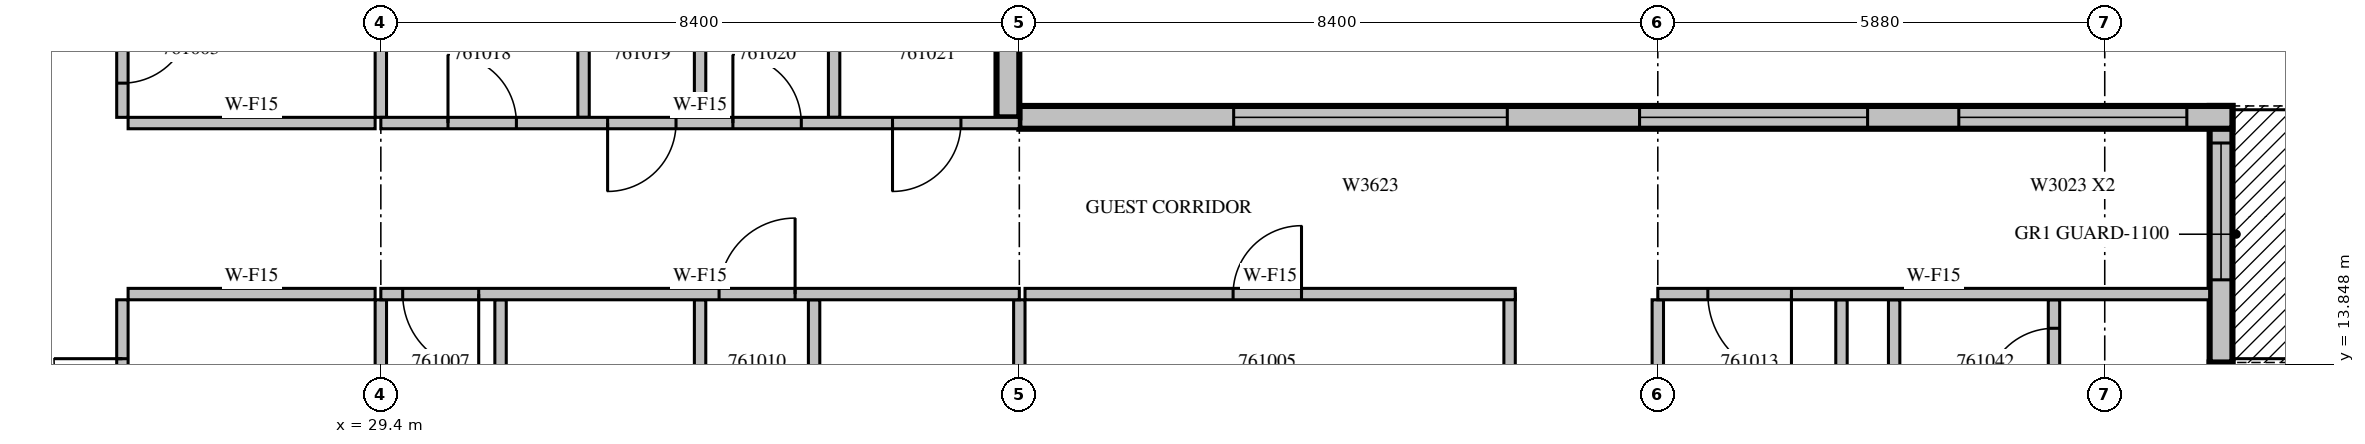
"""IFC4 building model, lengths in metres.
Left out: names, types, materials, properties, quantities, classifications, styles, units other than length and angle.
Written with IfcOpenShell. Run it as: python <this file> out.ifc"""

import sys

from ifc_helpers import new_model, si_unit, direction, frame, frame_2d, origin, place, context, subcontext, project, spatial, rectangle, extrude, source, transform, mapped, element, fill, save


model = new_model("IFC4")
c1 = context("Model", 3, precision=1e-05, world=origin(), true_north=direction((0.0, 1.0)))
c2 = subcontext(c1, "Body", "Model", "MODEL_VIEW")
j1 = project(units=[si_unit("LENGTHUNIT", "METRE"), si_unit("PLANEANGLEUNIT", "RADIAN")], contexts=[c1])
p1 = place(None, origin())
s1 = spatial("IfcSite", under=j1, at=p1, CompositionType="ELEMENT")
p2 = place(p1, origin())
s2 = spatial("IfcBuilding", under=s1, at=p2, CompositionType="ELEMENT")
p3 = place(p2, frame((0.0, 0.0, 265.2)))
s3 = spatial("IfcBuildingStorey", under=s2, at=p3, CompositionType="ELEMENT", Elevation=265.2)
m1 = source(origin(), c2, "Body", "SweptSolid", [
    extrude(rectangle(XDim=3.375, YDim=0.3, at=frame_2d((1.688, 0.0))), origin(), (0.0, 0.0, 1.0), 3.4),
])
p4 = place(p3, frame((53.61, 10.5, 0.0), z_axis=(0.0, 0.0, 1.0), x_axis=(0.0, 1.0, 0.0)))
e1 = element("IfcWall", 1, at=p4, inside=s3, PredefinedType="STANDARD", context=c2, shape_type="MappedRepresentation", body=[
    mapped(m1, transform((0.0, 0.0, 0.0), scale=1.0)),
])
m2 = source(origin(), c2, "Body", "SweptSolid", [
    extrude(rectangle(XDim=1.8, YDim=2.3, at=frame_2d((0.9, 1.15))), frame((0.0, 0.16, 0.0), z_axis=(0.0, -1.0, 0.0), x_axis=(1.0, 0.0, 0.0)), (0.0, 0.0, 1.0), 0.32),
])
p5 = place(p4, frame((0.787, 0.0, 0.6)))
e2 = element("IfcOpeningElement", 2, at=p5, cuts=e1, PredefinedType="OPENING", context=c2, shape_type="MappedRepresentation", body=[
    mapped(m2, transform((0.0, 0.0, 0.0), scale=1.0)),
])
p6 = place(p3, frame((53.61, 13.875, 0.0), z_axis=(0.0, 0.0, 1.0), x_axis=(0.0, 1.0, 0.0)))
e3 = element("IfcWall", 3, at=p6, inside=s3, PredefinedType="STANDARD", context=c2, shape_type="MappedRepresentation", body=[
    mapped(m1, transform((0.0, 0.0, 0.0), scale=1.0)),
])
m3 = source(origin(), c2, "Body", "SweptSolid", [
    extrude(rectangle(XDim=1.8, YDim=2.4, at=frame_2d((0.9, 1.2))), frame((0.0, 0.16, 0.0), z_axis=(0.0, -1.0, 0.0), x_axis=(1.0, 0.0, 0.0)), (0.0, 0.0, 1.0), 0.32),
])
p7 = place(p6, frame((1.087, 0.0, 0.0)))
e4 = element("IfcOpeningElement", 4, at=p7, cuts=e3, PredefinedType="OPENING", context=c2, shape_type="MappedRepresentation", body=[
    mapped(m3, transform((0.0, 0.0, 0.0), scale=1.0)),
])
m4 = source(origin(), c2, "Body", "SweptSolid", [
    extrude(rectangle(XDim=15.96, YDim=0.3, at=frame_2d((7.98, 0.0))), origin(), (0.0, 0.0, 1.0), 3.4),
])
p8 = place(p3, frame((53.76, 17.1, 0.0), z_axis=(0.0, 0.0, 1.0), x_axis=(-1.0, 0.0, 0.0)))
e5 = element("IfcWall", 5, at=p8, inside=s3, PredefinedType="STANDARD", context=c2, shape_type="MappedRepresentation", body=[
    mapped(m4, transform((0.0, 0.0, 0.0), scale=1.0)),
])
m5 = source(origin(), c2, "Body", "SweptSolid", [
    extrude(rectangle(XDim=3.0, YDim=2.3, at=frame_2d((1.5, 1.15))), frame((0.0, 0.16, 0.0), z_axis=(0.0, -1.0, 0.0), x_axis=(1.0, 0.0, 0.0)), (0.0, 0.0, 1.0), 0.32),
])
p9 = place(p8, frame((0.6, 0.0, 0.6)))
e6 = element("IfcOpeningElement", 6, at=p9, cuts=e5, PredefinedType="OPENING", context=c2, shape_type="MappedRepresentation", body=[
    mapped(m5, transform((0.0, 0.0, 0.0), scale=1.0)),
])
p10 = place(p8, frame((4.8, 0.0, 0.6)))
e7 = element("IfcOpeningElement", 7, at=p10, cuts=e5, PredefinedType="OPENING", context=c2, shape_type="MappedRepresentation", body=[
    mapped(m5, transform((0.0, 0.0, 0.0), scale=1.0)),
])
m6 = source(origin(), c2, "Body", "SweptSolid", [
    extrude(rectangle(XDim=3.6, YDim=2.3, at=frame_2d((1.8, 1.15))), frame((0.0, 0.16, 0.0), z_axis=(0.0, -1.0, 0.0), x_axis=(1.0, 0.0, 0.0)), (0.0, 0.0, 1.0), 0.32),
])
p11 = place(p8, frame((9.54, 0.0, 0.6)))
e8 = element("IfcOpeningElement", 8, at=p11, cuts=e5, PredefinedType="OPENING", context=c2, shape_type="MappedRepresentation", body=[
    mapped(m6, transform((0.0, 0.0, 0.0), scale=1.0)),
])
m7 = source(origin(), c2, "Body", "SweptSolid", [
    extrude(rectangle(XDim=3.1, YDim=0.3, at=frame_2d((1.55, 0.0))), origin(), (0.0, 0.0, 1.0), 3.4),
])
p12 = place(p3, frame((37.65, 17.1, 0.0), z_axis=(0.0, 0.0, 1.0), x_axis=(0.0, 1.0, 0.0)))
e9 = element("IfcWall", 9, at=p12, inside=s3, PredefinedType="STANDARD", context=c2, shape_type="MappedRepresentation", body=[
    mapped(m7, transform((0.0, 0.0, 0.0), scale=1.0)),
])
p13 = place(p12, frame((1.125, 0.0, 0.6)))
e10 = element("IfcOpeningElement", 10, at=p13, cuts=e9, PredefinedType="OPENING", context=c2, shape_type="MappedRepresentation", body=[
    mapped(m2, transform((0.0, 0.0, 0.0), scale=1.0)),
])
m8 = source(origin(), c2, "Body", "SweptSolid", [
    extrude(rectangle(XDim=11.225, YDim=0.15, at=frame_2d((5.612, 0.0))), origin(), (0.0, 0.0, 1.0), 3.4),
])
p14 = place(p3, frame((26.0, 14.7, 0.0), z_axis=(0.0, 0.0, 1.0), x_axis=(0.0, -1.0, 0.0)))
e11 = element("IfcWall", 11, at=p14, inside=s3, PredefinedType="PARTITIONING", context=c2, shape_type="MappedRepresentation", body=[
    mapped(m8, transform((0.0, 0.0, 0.0), scale=1.0)),
])
m9 = source(origin(), c2, "Body", "SweptSolid", [
    extrude(rectangle(XDim=0.9, YDim=2.1, at=frame_2d((0.45, 1.05))), frame((0.0, 0.085, 0.0), z_axis=(0.0, -1.0, 0.0), x_axis=(1.0, 0.0, 0.0)), (0.0, 0.0, 1.0), 0.17),
])
p15 = place(p14, frame((7.263, 0.0, 0.0)))
e12 = element("IfcOpeningElement", 12, at=p15, cuts=e11, PredefinedType="OPENING", context=c2, shape_type="MappedRepresentation", body=[
    mapped(m9, transform((0.0, 0.0, 0.0), scale=1.0)),
])
p16 = place(p14, frame((0.775, 0.0, 0.0)))
e13 = element("IfcOpeningElement", 13, at=p16, cuts=e11, PredefinedType="OPENING", context=c2, shape_type="MappedRepresentation", body=[
    mapped(m9, transform((0.0, 0.0, 0.0), scale=1.0)),
])
m10 = source(origin(), c2, "Body", "SweptSolid", [
    extrude(rectangle(XDim=3.6, YDim=0.15, at=frame_2d((1.8, 0.0))), origin(), (0.0, 0.0, 1.0), 3.4),
])
p17 = place(p3, frame((26.0, 20.7, 0.0), z_axis=(0.0, 0.0, 1.0), x_axis=(0.0, -1.0, 0.0)))
e14 = element("IfcWall", 14, at=p17, inside=s3, PredefinedType="PARTITIONING", context=c2, shape_type="MappedRepresentation", body=[
    mapped(m10, transform((0.0, 0.0, 0.0), scale=1.0)),
])
p18 = place(p17, frame((2.25, 0.0, 0.0)))
e15 = element("IfcOpeningElement", 15, at=p18, cuts=e14, PredefinedType="OPENING", context=c2, shape_type="MappedRepresentation", body=[
    mapped(m9, transform((0.0, 0.0, 0.0), scale=1.0)),
])
m11 = source(origin(), c2, "Body", "SweptSolid", [
    extrude(rectangle(XDim=3.25, YDim=0.15, at=frame_2d((1.625, 0.0))), origin(), (0.0, 0.0, 1.0), 3.4),
])
for number, where, z_axis, x_axis in (
    (16, (29.325, 14.775, 0.0), (0.0, 0.0, 1.0), (-1.0, 0.0, 0.0)),
    (17, (26.075, 17.025, 0.0), (0.0, 0.0, 1.0), (1.0, 0.0, 0.0)),
):
    element("IfcWall", number, at=place(p3, frame(where, z_axis=z_axis, x_axis=x_axis)), inside=s3, PredefinedType="PARTITIONING", context=c2, shape_type="MappedRepresentation", body=[
        mapped(m11, transform((0.0, 0.0, 0.0), scale=1.0)),
    ])
m12 = source(origin(), c2, "Body", "SweptSolid", [
    extrude(rectangle(XDim=3.801, YDim=0.15, at=frame_2d((1.901, 0.0))), origin(), (0.0, 0.0, 1.0), 3.4),
])
p19 = place(p3, frame((29.4, 10.899, 0.0), z_axis=(0.0, 0.0, 1.0), x_axis=(0.0, 1.0, 0.0)))
e18 = element("IfcWall", 18, at=p19, inside=s3, PredefinedType="PARTITIONING", context=c2, shape_type="MappedRepresentation", body=[
    mapped(m12, transform((0.0, 0.0, 0.0), scale=1.0)),
])
m13 = source(origin(), c2, "Body", "SweptSolid", [
    extrude(rectangle(XDim=3.101, YDim=0.15, at=frame_2d((1.55, 0.0))), origin(), (0.0, 0.0, 1.0), 3.4),
])
p20 = place(p3, frame((29.4, 17.1, 0.0), z_axis=(0.0, 0.0, 1.0), x_axis=(0.0, 1.0, 0.0)))
e19 = element("IfcWall", 19, at=p20, inside=s3, PredefinedType="PARTITIONING", context=c2, shape_type="MappedRepresentation", body=[
    mapped(m13, transform((0.0, 0.0, 0.0), scale=1.0)),
])
m14 = source(origin(), c2, "Body", "SweptSolid", [
    extrude(rectangle(XDim=2.475, YDim=0.15, at=frame_2d((1.238, 0.0))), origin(), (0.0, 0.0, 1.0), 3.4),
])
p21 = place(p3, frame((44.25, 12.3, 0.0), z_axis=(0.0, 0.0, 1.0), x_axis=(0.0, 1.0, 0.0)))
e20 = element("IfcWall", 20, at=p21, inside=s3, PredefinedType="PARTITIONING", context=c2, shape_type="MappedRepresentation", body=[
    mapped(m14, transform((0.0, 0.0, 0.0), scale=1.0)),
])
m15 = source(origin(), c2, "Body", "SweptSolid", [
    extrude(rectangle(XDim=6.45, YDim=0.15, at=frame_2d((3.225, 0.0))), origin(), (0.0, 0.0, 1.0), 3.4),
])
p22 = place(p3, frame((44.325, 14.775, 0.0), z_axis=(0.0, 0.0, 1.0), x_axis=(-1.0, 0.0, 0.0)))
e21 = element("IfcWall", 21, at=p22, inside=s3, PredefinedType="PARTITIONING", context=c2, shape_type="MappedRepresentation", body=[
    mapped(m15, transform((0.0, 0.0, 0.0), scale=1.0)),
])
p23 = place(p22, frame((2.812, 0.0, 0.0)))
e22 = element("IfcOpeningElement", 22, at=p23, cuts=e21, PredefinedType="OPENING", context=c2, shape_type="MappedRepresentation", body=[
    mapped(m9, transform((0.0, 0.0, 0.0), scale=1.0)),
])
m16 = source(origin(), c2, "Body", "SweptSolid", [
    extrude(rectangle(XDim=3.65, YDim=0.15, at=frame_2d((1.825, 0.0))), origin(), (0.0, 0.0, 1.0), 3.4),
])
for number, where, z_axis, x_axis in (
    (23, (30.975, 11.05, 0.0), (0.0, 0.0, 1.0), (0.0, 1.0, 0.0)),
    (24, (33.6, 11.05, 0.0), (0.0, 0.0, 1.0), (0.0, 1.0, 0.0)),
    (25, (35.1, 11.05, 0.0), (0.0, 0.0, 1.0), (0.0, 1.0, 0.0)),
    (26, (37.8, 11.05, 0.0), (0.0, 0.0, 1.0), (0.0, 1.0, 0.0)),
    (27, (48.617, 11.05, 0.0), (0.0, 0.0, 1.0), (0.0, 1.0, 0.0)),
    (28, (49.309, 11.05, 0.0), (0.0, 0.0, 1.0), (0.0, 1.0, 0.0)),
):
    element("IfcWall", number, at=place(p3, frame(where, z_axis=z_axis, x_axis=x_axis)), inside=s3, PredefinedType="PARTITIONING", context=c2, shape_type="MappedRepresentation", body=[
        mapped(m16, transform((0.0, 0.0, 0.0), scale=1.0)),
    ])
p24 = place(p3, frame((51.412, 11.05, 0.0), z_axis=(0.0, 0.0, 1.0), x_axis=(0.0, 1.0, 0.0)))
e29 = element("IfcWall", 29, at=p24, inside=s3, PredefinedType="PARTITIONING", context=c2, shape_type="MappedRepresentation", body=[
    mapped(m16, transform((0.0, 0.0, 0.0), scale=1.0)),
])
p25 = place(p24, frame((1.375, 0.0, 0.0)))
e30 = element("IfcOpeningElement", 30, at=p25, cuts=e29, PredefinedType="OPENING", context=c2, shape_type="MappedRepresentation", body=[
    mapped(m9, transform((0.0, 0.0, 0.0), scale=1.0)),
])
p26 = place(p24, frame((2.375, 0.0, 0.0)))
e31 = element("IfcOpeningElement", 31, at=p26, cuts=e29, PredefinedType="OPENING", context=c2, shape_type="MappedRepresentation", body=[
    mapped(m9, transform((0.0, 0.0, 0.0), scale=1.0)),
])
p27 = place(p24, frame((0.375, 0.0, 0.0)))
e32 = element("IfcOpeningElement", 32, at=p27, cuts=e29, PredefinedType="OPENING", context=c2, shape_type="MappedRepresentation", body=[
    mapped(m9, transform((0.0, 0.0, 0.0), scale=1.0)),
])
p28 = place(p3, frame((46.2, 11.05, 0.0), z_axis=(0.0, 0.0, 1.0), x_axis=(0.0, 1.0, 0.0)))
e33 = element("IfcWall", 33, at=p28, inside=s3, PredefinedType="PARTITIONING", context=c2, shape_type="MappedRepresentation", body=[
    mapped(m16, transform((0.0, 0.0, 0.0), scale=1.0)),
])
for number, where, z_axis, x_axis in (
    (34, (32.067, 20.7, 0.0), (0.0, 0.0, 1.0), (0.0, -1.0, 0.0)),
    (35, (35.363, 20.7, 0.0), (0.0, 0.0, 1.0), (0.0, -1.0, 0.0)),
    (36, (33.6, 17.1, 0.0), (0.0, 0.0, 1.0), (0.0, 1.0, 0.0)),
):
    element("IfcWall", number, at=place(p3, frame(where, z_axis=z_axis, x_axis=x_axis)), inside=s3, PredefinedType="PARTITIONING", context=c2, shape_type="MappedRepresentation", body=[
        mapped(m10, transform((0.0, 0.0, 0.0), scale=1.0)),
    ])
m17 = source(origin(), c2, "Body", "SweptSolid", [
    extrude(rectangle(XDim=8.4, YDim=0.15, at=frame_2d((4.2, 0.0))), origin(), (0.0, 0.0, 1.0), 3.4),
])
p29 = place(p3, frame((37.8, 14.775, 0.0), z_axis=(0.0, 0.0, 1.0), x_axis=(-1.0, 0.0, 0.0)))
e37 = element("IfcWall", 37, at=p29, inside=s3, PredefinedType="PARTITIONING", context=c2, shape_type="MappedRepresentation", body=[
    mapped(m17, transform((0.0, 0.0, 0.0), scale=1.0)),
])
m18 = source(origin(), c2, "Body", "SweptSolid", [
    extrude(rectangle(XDim=1.0, YDim=2.1, at=frame_2d((0.5, 1.05))), frame((0.0, 0.085, 0.0), z_axis=(0.0, -1.0, 0.0), x_axis=(1.0, 0.0, 0.0)), (0.0, 0.0, 1.0), 0.17),
])
p30 = place(p29, frame((7.112, 0.0, 0.0)))
e38 = element("IfcOpeningElement", 38, at=p30, cuts=e37, PredefinedType="OPENING", context=c2, shape_type="MappedRepresentation", body=[
    mapped(m18, transform((0.0, 0.0, 0.0), scale=1.0)),
])
p31 = place(p29, frame((2.95, 0.0, 0.0)))
e39 = element("IfcOpeningElement", 39, at=p31, cuts=e37, PredefinedType="OPENING", context=c2, shape_type="MappedRepresentation", body=[
    mapped(m18, transform((0.0, 0.0, 0.0), scale=1.0)),
])
m19 = source(origin(), c2, "Body", "SweptSolid", [
    extrude(rectangle(XDim=7.26, YDim=0.15, at=frame_2d((3.63, 0.0))), origin(), (0.0, 0.0, 1.0), 3.4),
])
p32 = place(p3, frame((53.46, 14.775, 0.0), z_axis=(0.0, 0.0, 1.0), x_axis=(-1.0, 0.0, 0.0)))
e40 = element("IfcWall", 40, at=p32, inside=s3, PredefinedType="PARTITIONING", context=c2, shape_type="MappedRepresentation", body=[
    mapped(m19, transform((0.0, 0.0, 0.0), scale=1.0)),
])
m20 = source(origin(), c2, "Body", "SweptSolid", [
    extrude(rectangle(XDim=1.1, YDim=2.1, at=frame_2d((0.55, 1.05))), frame((0.0, 0.085, 0.0), z_axis=(0.0, -1.0, 0.0), x_axis=(1.0, 0.0, 0.0)), (0.0, 0.0, 1.0), 0.17),
])
p33 = place(p32, frame((5.502, 0.0, 0.0)))
e41 = element("IfcOpeningElement", 41, at=p33, cuts=e40, PredefinedType="OPENING", context=c2, shape_type="MappedRepresentation", body=[
    mapped(m20, transform((0.0, 0.0, 0.0), scale=1.0)),
])
p34 = place(p3, frame((29.4, 17.025, 0.0), z_axis=(0.0, 0.0, 1.0), x_axis=(1.0, 0.0, 0.0)))
e42 = element("IfcWall", 42, at=p34, inside=s3, PredefinedType="PARTITIONING", context=c2, shape_type="MappedRepresentation", body=[
    mapped(m17, transform((0.0, 0.0, 0.0), scale=1.0)),
])
p35 = place(p34, frame((0.883, 0.0, 0.0)))
e43 = element("IfcOpeningElement", 43, at=p35, cuts=e42, PredefinedType="OPENING", context=c2, shape_type="MappedRepresentation", body=[
    mapped(m9, transform((0.0, 0.0, 0.0), scale=1.0)),
])
p36 = place(p34, frame((2.983, 0.0, 0.0)))
e44 = element("IfcOpeningElement", 44, at=p36, cuts=e42, PredefinedType="OPENING", context=c2, shape_type="MappedRepresentation", body=[
    mapped(m9, transform((0.0, 0.0, 0.0), scale=1.0)),
])
p37 = place(p34, frame((4.632, 0.0, 0.0)))
e45 = element("IfcOpeningElement", 45, at=p37, cuts=e42, PredefinedType="OPENING", context=c2, shape_type="MappedRepresentation", body=[
    mapped(m9, transform((0.0, 0.0, 0.0), scale=1.0)),
])
p38 = place(p34, frame((6.732, 0.0, 0.0)))
e46 = element("IfcOpeningElement", 46, at=p38, cuts=e42, PredefinedType="OPENING", context=c2, shape_type="MappedRepresentation", body=[
    mapped(m9, transform((0.0, 0.0, 0.0), scale=1.0)),
])
m21 = source(origin(), c2, "Body", "SweptSolid", [
    extrude(rectangle(XDim=1.8, YDim=2.4, at=frame_2d((0.9, 1.2))), frame((0.0, 0.025, 0.0), z_axis=(0.0, -1.0, 0.0), x_axis=(1.0, 0.0, 0.0)), (0.0, 0.0, 1.0), 0.05),
])
p39 = place(p7, origin())
e47 = element("IfcDoor", 47, at=p39, inside=s3, OperationType="SLIDING_TO_LEFT", PredefinedType="DOOR", context=c2, shape_type="MappedRepresentation", body=[
    mapped(m21, transform((0.0, 0.0, 0.0), scale=1.0)),
])
fill(e4, e47)
m22 = source(origin(), c2, "Body", "SweptSolid", [
    extrude(rectangle(XDim=3.0, YDim=2.3, at=frame_2d((1.5, 1.15))), frame((0.0, 0.03, 0.0), z_axis=(0.0, -1.0, 0.0), x_axis=(1.0, 0.0, 0.0)), (0.0, 0.0, 1.0), 0.06),
])
p40 = place(p9, origin())
e48 = element("IfcWindow", 48, at=p40, inside=s3, PartitioningType="SINGLE_PANEL", PredefinedType="WINDOW", context=c2, shape_type="MappedRepresentation", body=[
    mapped(m22, transform((0.0, 0.0, 0.0), scale=1.0)),
])
fill(e6, e48)
p41 = place(p10, origin())
e49 = element("IfcWindow", 49, at=p41, inside=s3, PartitioningType="SINGLE_PANEL", PredefinedType="WINDOW", context=c2, shape_type="MappedRepresentation", body=[
    mapped(m22, transform((0.0, 0.0, 0.0), scale=1.0)),
])
fill(e7, e49)
m23 = source(origin(), c2, "Body", "SweptSolid", [
    extrude(rectangle(XDim=3.6, YDim=2.3, at=frame_2d((1.8, 1.15))), frame((0.0, 0.03, 0.0), z_axis=(0.0, -1.0, 0.0), x_axis=(1.0, 0.0, 0.0)), (0.0, 0.0, 1.0), 0.06),
])
p42 = place(p11, origin())
e50 = element("IfcWindow", 50, at=p42, inside=s3, PartitioningType="SINGLE_PANEL", PredefinedType="WINDOW", context=c2, shape_type="MappedRepresentation", body=[
    mapped(m23, transform((0.0, 0.0, 0.0), scale=1.0)),
])
fill(e8, e50)
m24 = source(origin(), c2, "Body", "SweptSolid", [
    extrude(rectangle(XDim=0.9, YDim=2.1, at=frame_2d((0.45, 1.05))), frame((0.0, 0.025, 0.0), z_axis=(0.0, -1.0, 0.0), x_axis=(1.0, 0.0, 0.0)), (0.0, 0.0, 1.0), 0.05),
])
p43 = place(p16, origin())
e51 = element("IfcDoor", 51, at=p43, inside=s3, OperationType="SINGLE_SWING_RIGHT", PredefinedType="DOOR", context=c2, shape_type="MappedRepresentation", body=[
    mapped(m24, transform((0.0, 0.0, 0.0), scale=1.0)),
])
fill(e13, e51)
p44 = place(p18, origin())
e52 = element("IfcDoor", 52, at=p44, inside=s3, OperationType="SINGLE_SWING_LEFT", PredefinedType="DOOR", context=c2, shape_type="MappedRepresentation", body=[
    mapped(m24, transform((0.0, 0.0, 0.0), scale=1.0)),
])
fill(e15, e52)
p45 = place(p23, origin())
e53 = element("IfcDoor", 53, at=p45, inside=s3, OperationType="SINGLE_SWING_RIGHT", PredefinedType="DOOR", context=c2, shape_type="MappedRepresentation", body=[
    mapped(m24, transform((0.0, 0.0, 0.0), scale=1.0)),
])
fill(e22, e53)
m25 = source(origin(), c2, "Body", "SweptSolid", [
    extrude(rectangle(XDim=1.0, YDim=2.1, at=frame_2d((0.5, 1.05))), frame((0.0, 0.025, 0.0), z_axis=(0.0, -1.0, 0.0), x_axis=(1.0, 0.0, 0.0)), (0.0, 0.0, 1.0), 0.05),
])
p46 = place(p30, origin())
e54 = element("IfcDoor", 54, at=p46, inside=s3, OperationType="SINGLE_SWING_LEFT", PredefinedType="DOOR", context=c2, shape_type="MappedRepresentation", body=[
    mapped(m25, transform((0.0, 0.0, 0.0), scale=1.0)),
])
fill(e38, e54)
p47 = place(p31, origin())
e55 = element("IfcDoor", 55, at=p47, inside=s3, OperationType="SINGLE_SWING_RIGHT", PredefinedType="DOOR", context=c2, shape_type="MappedRepresentation", body=[
    mapped(m25, transform((0.0, 0.0, 0.0), scale=1.0)),
])
fill(e39, e55)
m26 = source(origin(), c2, "Body", "SweptSolid", [
    extrude(rectangle(XDim=1.1, YDim=2.1, at=frame_2d((0.55, 1.05))), frame((0.0, 0.025, 0.0), z_axis=(0.0, -1.0, 0.0), x_axis=(1.0, 0.0, 0.0)), (0.0, 0.0, 1.0), 0.05),
])
p48 = place(p33, origin())
e56 = element("IfcDoor", 56, at=p48, inside=s3, OperationType="SINGLE_SWING_LEFT", PredefinedType="DOOR", context=c2, shape_type="MappedRepresentation", body=[
    mapped(m26, transform((0.0, 0.0, 0.0), scale=1.0)),
])
fill(e41, e56)
p49 = place(p35, origin())
e57 = element("IfcDoor", 57, at=p49, inside=s3, OperationType="SINGLE_SWING_LEFT", PredefinedType="DOOR", context=c2, shape_type="MappedRepresentation", body=[
    mapped(m24, transform((0.0, 0.0, 0.0), scale=1.0)),
])
fill(e43, e57)
p50 = place(p36, origin())
e58 = element("IfcDoor", 58, at=p50, inside=s3, OperationType="SINGLE_SWING_RIGHT", PredefinedType="DOOR", context=c2, shape_type="MappedRepresentation", body=[
    mapped(m24, transform((0.0, 0.0, 0.0), scale=1.0)),
])
fill(e44, e58)
p51 = place(p37, origin())
e59 = element("IfcDoor", 59, at=p51, inside=s3, OperationType="SINGLE_SWING_LEFT", PredefinedType="DOOR", context=c2, shape_type="MappedRepresentation", body=[
    mapped(m24, transform((0.0, 0.0, 0.0), scale=1.0)),
])
fill(e45, e59)
p52 = place(p38, origin())
e60 = element("IfcDoor", 60, at=p52, inside=s3, OperationType="SINGLE_SWING_RIGHT", PredefinedType="DOOR", context=c2, shape_type="MappedRepresentation", body=[
    mapped(m24, transform((0.0, 0.0, 0.0), scale=1.0)),
])
fill(e46, e60)
p53 = place(p26, origin())
e61 = element("IfcDoor", 61, at=p53, inside=s3, OperationType="SINGLE_SWING_LEFT", PredefinedType="DOOR", context=c2, shape_type="MappedRepresentation", body=[
    mapped(m24, transform((0.0, 0.0, 0.0), scale=1.0)),
])
fill(e31, e61)
save(model, sys.argv[1])
